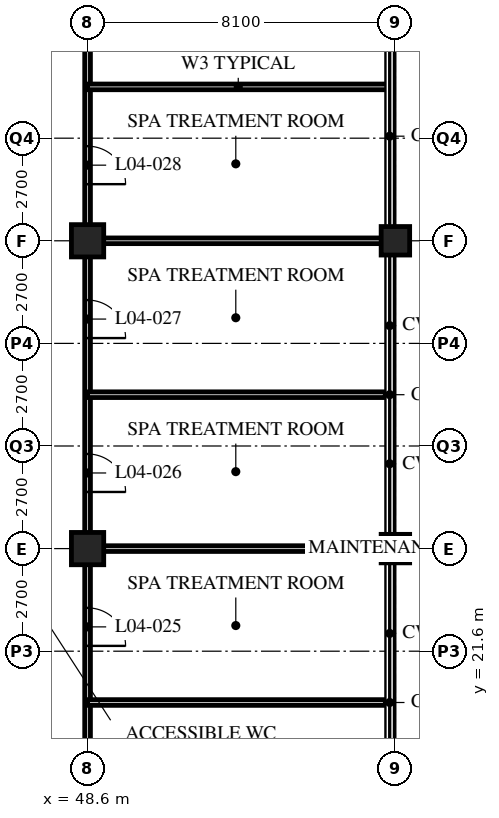
"""IFC4 building model, lengths in metres.
Left out: names, types, materials, properties, quantities, classifications, styles, units other than length and angle.
Written with IfcOpenShell. Run it as: python <this file> out.ifc"""

import sys

from ifc_helpers import new_model, si_unit, direction, frame, frame_2d, origin, origin_2d, place, context, subcontext, project, spatial, rectangle, hollow_rectangle, extrude, element, fill, save


model = new_model("IFC4")
c1 = context("Model", 3, precision=1e-05, world=origin(), true_north=direction((0.0, 1.0)))
c2 = subcontext(c1, "Body", "Model", "MODEL_VIEW")
j1 = project(units=[si_unit("LENGTHUNIT", "METRE"), si_unit("PLANEANGLEUNIT", "RADIAN")], contexts=[c1])
p1 = place(None, origin())
s1 = spatial("IfcSite", under=j1, at=p1, CompositionType="ELEMENT")
p2 = place(p1, origin())
s2 = spatial("IfcBuilding", under=s1, at=p2, CompositionType="ELEMENT")
p3 = place(p2, frame((0.0, 0.0, 22.2)))
s3 = spatial("IfcBuildingStorey", under=s2, at=p3, CompositionType="ELEMENT", Elevation=22.2)
for number, where, z_axis, x_axis in (
    (1, (48.6, 24.3, 0.0), (0.0, 0.0, 1.0), (1.0, 0.0, 0.0)),
    (2, (48.6, 32.4, 0.0), (0.0, 0.0, 1.0), (1.0, 0.0, 0.0)),
):
    element("IfcColumn", number, at=place(p3, frame(where, z_axis=z_axis, x_axis=x_axis)), inside=s3, PredefinedType="COLUMN", context=c2, shape_type="SweptSolid", body=[
        extrude(hollow_rectangle(XDim=0.85, YDim=0.85, WallThickness=0.085, at=origin_2d()), origin(), (0.0, 0.0, 1.0), 5.4),
    ])
for number, where, z_axis, x_axis in (
    (3, (56.7, 24.3, 0.0), (0.0, 0.0, 1.0), (1.0, 0.0, 0.0)),
    (4, (56.7, 32.4, 0.0), (0.0, 0.0, 1.0), (1.0, 0.0, 0.0)),
):
    element("IfcColumn", number, at=place(p3, frame(where, z_axis=z_axis, x_axis=x_axis)), inside=s3, PredefinedType="COLUMN", context=c2, shape_type="SweptSolid", body=[
        extrude(hollow_rectangle(XDim=0.75, YDim=0.75, WallThickness=0.07, at=origin_2d()), origin(), (0.0, 0.0, 1.0), 5.4),
    ])
p4 = place(p3, frame((48.6, 8.065, 0.0), z_axis=(0.0, 0.0, 1.0), x_axis=(0.0, 1.0, 0.0)))
e5 = element("IfcWall", 5, at=p4, inside=s3, PredefinedType="PARTITIONING", context=c2, shape_type="SweptSolid", body=[
    extrude(rectangle(XDim=34.385, YDim=0.15, at=frame_2d((17.192, 0.0))), origin(), (0.0, 0.0, 1.0), 4.428),
])
p5 = place(p4, frame((3.15, 0.0, 0.0)))
e6 = element("IfcOpeningElement", 6, at=p5, cuts=e5, PredefinedType="OPENING", context=c2, shape_type="SweptSolid", body=[
    extrude(rectangle(XDim=1.8, YDim=2.4, at=frame_2d((0.9, 1.2))), frame((0.0, 0.085, 0.0), z_axis=(0.0, -1.0, 0.0), x_axis=(1.0, 0.0, 0.0)), (0.0, 0.0, 1.0), 0.17),
])
p6 = place(p4, frame((9.625, 0.0, 0.0)))
e7 = element("IfcOpeningElement", 7, at=p6, cuts=e5, PredefinedType="OPENING", context=c2, shape_type="SweptSolid", body=[
    extrude(rectangle(XDim=1.0, YDim=2.1, at=frame_2d((0.5, 1.05))), frame((0.0, 0.085, 0.0), z_axis=(0.0, -1.0, 0.0), x_axis=(1.0, 0.0, 0.0)), (0.0, 0.0, 1.0), 0.17),
])
p7 = place(p4, frame((13.675, 0.0, 0.0)))
e8 = element("IfcOpeningElement", 8, at=p7, cuts=e5, PredefinedType="OPENING", context=c2, shape_type="SweptSolid", body=[
    extrude(rectangle(XDim=1.0, YDim=2.1, at=frame_2d((0.5, 1.05))), frame((0.0, 0.085, 0.0), z_axis=(0.0, -1.0, 0.0), x_axis=(1.0, 0.0, 0.0)), (0.0, 0.0, 1.0), 0.17),
])
p8 = place(p4, frame((17.725, 0.0, 0.0)))
e9 = element("IfcOpeningElement", 9, at=p8, cuts=e5, PredefinedType="OPENING", context=c2, shape_type="SweptSolid", body=[
    extrude(rectangle(XDim=1.0, YDim=2.1, at=frame_2d((0.5, 1.05))), frame((0.0, 0.085, 0.0), z_axis=(0.0, -1.0, 0.0), x_axis=(1.0, 0.0, 0.0)), (0.0, 0.0, 1.0), 0.17),
])
p9 = place(p4, frame((21.775, 0.0, 0.0)))
e10 = element("IfcOpeningElement", 10, at=p9, cuts=e5, PredefinedType="OPENING", context=c2, shape_type="SweptSolid", body=[
    extrude(rectangle(XDim=1.0, YDim=2.1, at=frame_2d((0.5, 1.05))), frame((0.0, 0.085, 0.0), z_axis=(0.0, -1.0, 0.0), x_axis=(1.0, 0.0, 0.0)), (0.0, 0.0, 1.0), 0.17),
])
p10 = place(p4, frame((25.825, 0.0, 0.0)))
e11 = element("IfcOpeningElement", 11, at=p10, cuts=e5, PredefinedType="OPENING", context=c2, shape_type="SweptSolid", body=[
    extrude(rectangle(XDim=1.0, YDim=2.1, at=frame_2d((0.5, 1.05))), frame((0.0, 0.085, 0.0), z_axis=(0.0, -1.0, 0.0), x_axis=(1.0, 0.0, 0.0)), (0.0, 0.0, 1.0), 0.17),
])
p11 = place(p4, frame((30.6, 0.0, 0.0)))
e12 = element("IfcOpeningElement", 12, at=p11, cuts=e5, PredefinedType="OPENING", context=c2, shape_type="SweptSolid", body=[
    extrude(rectangle(XDim=1.0, YDim=2.1, at=frame_2d((0.5, 1.05))), frame((0.0, 0.085, 0.0), z_axis=(0.0, -1.0, 0.0), x_axis=(1.0, 0.0, 0.0)), (0.0, 0.0, 1.0), 0.17),
])
p12 = place(p3, frame((48.6, 20.25, 0.0), z_axis=(0.0, 0.0, 1.0), x_axis=(1.0, 0.0, 0.0)))
e13 = element("IfcWall", 13, at=p12, inside=s3, PredefinedType="PARTITIONING", context=c2, shape_type="SweptSolid", body=[
    extrude(rectangle(XDim=7.834, YDim=0.15, at=frame_2d((3.917, 0.0))), origin(), (0.0, 0.0, 1.0), 5.19),
])
p13 = place(p3, frame((48.6, 24.3, 0.0), z_axis=(0.0, 0.0, 1.0), x_axis=(1.0, 0.0, 0.0)))
e14 = element("IfcWall", 14, at=p13, inside=s3, PredefinedType="PARTITIONING", context=c2, shape_type="SweptSolid", body=[
    extrude(rectangle(XDim=7.8, YDim=0.15, at=frame_2d((3.9, 0.0))), origin(), (0.0, 0.0, 1.0), 4.428),
])
p14 = place(p3, frame((48.6, 28.35, 0.0), z_axis=(0.0, 0.0, 1.0), x_axis=(1.0, 0.0, 0.0)))
e15 = element("IfcWall", 15, at=p14, inside=s3, PredefinedType="PARTITIONING", context=c2, shape_type="SweptSolid", body=[
    extrude(rectangle(XDim=7.834, YDim=0.15, at=frame_2d((3.917, 0.0))), origin(), (0.0, 0.0, 1.0), 5.19),
])
p15 = place(p3, frame((48.6, 32.4, 0.0), z_axis=(0.0, 0.0, 1.0), x_axis=(1.0, 0.0, 0.0)))
e16 = element("IfcWall", 16, at=p15, inside=s3, PredefinedType="PARTITIONING", context=c2, shape_type="SweptSolid", body=[
    extrude(rectangle(XDim=7.8, YDim=0.15, at=frame_2d((3.9, 0.0))), origin(), (0.0, 0.0, 1.0), 4.428),
])
p16 = place(p3, frame((48.6, 36.45, 0.0), z_axis=(0.0, 0.0, 1.0), x_axis=(1.0, 0.0, 0.0)))
e17 = element("IfcWall", 17, at=p16, inside=s3, PredefinedType="PARTITIONING", context=c2, shape_type="SweptSolid", body=[
    extrude(rectangle(XDim=7.93, YDim=0.15, at=frame_2d((3.965, 0.0))), origin(), (0.0, 0.0, 1.0), 5.19),
])
p17 = place(p7, origin())
e18 = element("IfcDoor", 18, at=p17, inside=s3, OperationType="SINGLE_SWING_RIGHT", PredefinedType="DOOR", context=c2, shape_type="SweptSolid", body=[
    extrude(rectangle(XDim=1.0, YDim=2.1, at=frame_2d((0.5, 1.05))), frame((0.0, 0.025, 0.0), z_axis=(0.0, -1.0, 0.0), x_axis=(1.0, 0.0, 0.0)), (0.0, 0.0, 1.0), 0.05),
])
fill(e8, e18)
p18 = place(p8, origin())
e19 = element("IfcDoor", 19, at=p18, inside=s3, OperationType="SINGLE_SWING_RIGHT", PredefinedType="DOOR", context=c2, shape_type="SweptSolid", body=[
    extrude(rectangle(XDim=1.0, YDim=2.1, at=frame_2d((0.5, 1.05))), frame((0.0, 0.025, 0.0), z_axis=(0.0, -1.0, 0.0), x_axis=(1.0, 0.0, 0.0)), (0.0, 0.0, 1.0), 0.05),
])
fill(e9, e19)
p19 = place(p9, origin())
e20 = element("IfcDoor", 20, at=p19, inside=s3, OperationType="SINGLE_SWING_RIGHT", PredefinedType="DOOR", context=c2, shape_type="SweptSolid", body=[
    extrude(rectangle(XDim=1.0, YDim=2.1, at=frame_2d((0.5, 1.05))), frame((0.0, 0.025, 0.0), z_axis=(0.0, -1.0, 0.0), x_axis=(1.0, 0.0, 0.0)), (0.0, 0.0, 1.0), 0.05),
])
fill(e10, e20)
p20 = place(p10, origin())
e21 = element("IfcDoor", 21, at=p20, inside=s3, OperationType="SINGLE_SWING_RIGHT", PredefinedType="DOOR", context=c2, shape_type="SweptSolid", body=[
    extrude(rectangle(XDim=1.0, YDim=2.1, at=frame_2d((0.5, 1.05))), frame((0.0, 0.025, 0.0), z_axis=(0.0, -1.0, 0.0), x_axis=(1.0, 0.0, 0.0)), (0.0, 0.0, 1.0), 0.05),
])
fill(e11, e21)
save(model, sys.argv[1])
